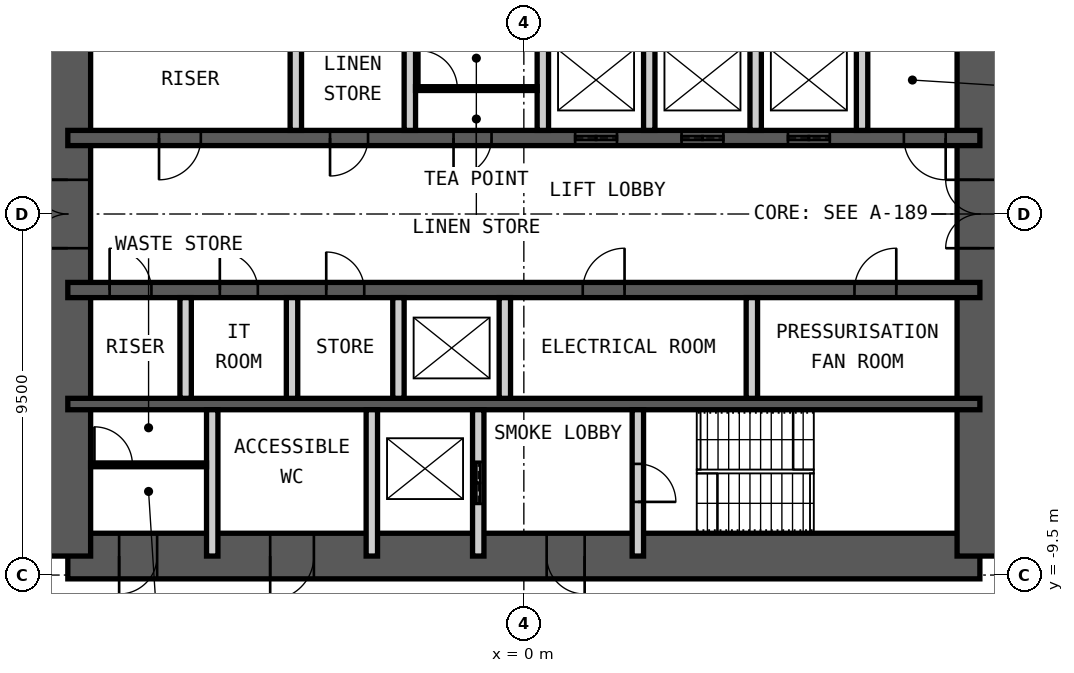
"""IFC4 building model, lengths in metres.
Left out: names, types, materials, properties, quantities, classifications, styles, units other than length and angle.
Written with IfcOpenShell. Run it as: python <this file> out.ifc"""

import sys

from ifc_helpers import new_model, si_unit, direction, frame, frame_2d, origin, place, context, subcontext, project, spatial, rectangle, extrude, element, fill, save


model = new_model("IFC4")
c1 = context("Model", 3, precision=1e-05, world=origin(), true_north=direction((0.0, 1.0)))
c2 = subcontext(c1, "Body", "Model", "MODEL_VIEW")
j1 = project(units=[si_unit("LENGTHUNIT", "METRE"), si_unit("PLANEANGLEUNIT", "RADIAN")], contexts=[c1])
p1 = place(None, origin())
s1 = spatial("IfcSite", under=j1, at=p1, CompositionType="ELEMENT")
p2 = place(p1, origin())
s2 = spatial("IfcBuilding", under=s1, at=p2, CompositionType="ELEMENT")
p3 = place(p2, frame((0.0, 0.0, 251.8)))
s3 = spatial("IfcBuildingStorey", under=s2, at=p3, CompositionType="ELEMENT", Elevation=251.8)
p4 = place(p3, frame((-12.0, -9.0, 0.0), z_axis=(0.0, 0.0, 1.0), x_axis=(1.0, 0.0, 0.0)))
e1 = element("IfcWall", 1, at=p4, inside=s3, PredefinedType="SHEAR", context=c2, shape_type="SweptSolid", body=[
    extrude(rectangle(XDim=24.0, YDim=1.2, at=frame_2d((12.0, 0.0))), origin(), (0.0, 0.0, 1.0), 4.2),
])
p5 = place(p4, frame((1.35, 0.0, 0.0)))
e2 = element("IfcOpeningElement", 2, at=p5, cuts=e1, PredefinedType="OPENING", context=c2, shape_type="SweptSolid", body=[
    extrude(rectangle(XDim=1.0, YDim=2.1, at=frame_2d((0.5, 1.05))), frame((0.0, 0.61, 0.0), z_axis=(0.0, -1.0, 0.0), x_axis=(1.0, 0.0, 0.0)), (0.0, 0.0, 1.0), 1.22),
])
p6 = place(p4, frame((5.325, 0.0, 0.0)))
e3 = element("IfcOpeningElement", 3, at=p6, cuts=e1, PredefinedType="OPENING", context=c2, shape_type="SweptSolid", body=[
    extrude(rectangle(XDim=1.15, YDim=2.1, at=frame_2d((0.575, 1.05))), frame((0.0, 0.61, 0.0), z_axis=(0.0, -1.0, 0.0), x_axis=(1.0, 0.0, 0.0)), (0.0, 0.0, 1.0), 1.22),
])
p7 = place(p4, frame((12.6, 0.0, 0.0)))
e4 = element("IfcOpeningElement", 4, at=p7, cuts=e1, PredefinedType="OPENING", context=c2, shape_type="SweptSolid", body=[
    extrude(rectangle(XDim=1.0, YDim=2.1, at=frame_2d((0.5, 1.05))), frame((0.0, 0.61, 0.0), z_axis=(0.0, -1.0, 0.0), x_axis=(1.0, 0.0, 0.0)), (0.0, 0.0, 1.0), 1.22),
])
p8 = place(p3, frame((12.0, -9.0, 0.0), z_axis=(0.0, 0.0, 1.0), x_axis=(0.0, 1.0, 0.0)))
e5 = element("IfcWall", 5, at=p8, inside=s3, PredefinedType="SHEAR", context=c2, shape_type="SweptSolid", body=[
    extrude(rectangle(XDim=18.0, YDim=1.2, at=frame_2d((9.0, 0.0))), origin(), (0.0, 0.0, 1.0), 4.2),
])
p9 = place(p8, frame((8.1, 0.0, 0.0)))
e6 = element("IfcOpeningElement", 6, at=p9, cuts=e5, PredefinedType="OPENING", context=c2, shape_type="SweptSolid", body=[
    extrude(rectangle(XDim=1.8, YDim=2.1, at=frame_2d((0.9, 1.05))), frame((0.0, 0.61, 0.0), z_axis=(0.0, -1.0, 0.0), x_axis=(1.0, 0.0, 0.0)), (0.0, 0.0, 1.0), 1.22),
])
p10 = place(p3, frame((-12.0, -9.0, 0.0), z_axis=(0.0, 0.0, 1.0), x_axis=(0.0, 1.0, 0.0)))
e7 = element("IfcWall", 7, at=p10, inside=s3, PredefinedType="SHEAR", context=c2, shape_type="SweptSolid", body=[
    extrude(rectangle(XDim=18.0, YDim=1.2, at=frame_2d((9.0, 0.0))), origin(), (0.0, 0.0, 1.0), 4.2),
])
p11 = place(p10, frame((8.1, 0.0, 0.0)))
e8 = element("IfcOpeningElement", 8, at=p11, cuts=e7, PredefinedType="OPENING", context=c2, shape_type="SweptSolid", body=[
    extrude(rectangle(XDim=1.8, YDim=2.1, at=frame_2d((0.9, 1.05))), frame((0.0, 0.61, 0.0), z_axis=(0.0, -1.0, 0.0), x_axis=(1.0, 0.0, 0.0)), (0.0, 0.0, 1.0), 1.22),
])
p12 = place(p3, frame((-12.0, 2.0, 0.0), z_axis=(0.0, 0.0, 1.0), x_axis=(1.0, 0.0, 0.0)))
e9 = element("IfcWall", 9, at=p12, inside=s3, PredefinedType="SHEAR", context=c2, shape_type="SweptSolid", body=[
    extrude(rectangle(XDim=24.0, YDim=0.4, at=frame_2d((12.0, 0.0))), origin(), (0.0, 0.0, 1.0), 4.2),
])
p13 = place(p12, frame((2.4, 0.0, 0.0)))
e10 = element("IfcOpeningElement", 10, at=p13, cuts=e9, PredefinedType="OPENING", context=c2, shape_type="SweptSolid", body=[
    extrude(rectangle(XDim=1.1, YDim=2.1, at=frame_2d((0.55, 1.05))), frame((0.0, 0.21, 0.0), z_axis=(0.0, -1.0, 0.0), x_axis=(1.0, 0.0, 0.0)), (0.0, 0.0, 1.0), 0.42),
])
p14 = place(p12, frame((22.0, 0.0, 0.0)))
e11 = element("IfcOpeningElement", 11, at=p14, cuts=e9, PredefinedType="OPENING", context=c2, shape_type="SweptSolid", body=[
    extrude(rectangle(XDim=1.1, YDim=2.1, at=frame_2d((0.55, 1.05))), frame((0.0, 0.21, 0.0), z_axis=(0.0, -1.0, 0.0), x_axis=(1.0, 0.0, 0.0)), (0.0, 0.0, 1.0), 0.42),
])
p15 = place(p12, frame((10.15, 0.0, 0.0)))
e12 = element("IfcOpeningElement", 12, at=p15, cuts=e9, PredefinedType="OPENING", context=c2, shape_type="SweptSolid", body=[
    extrude(rectangle(XDim=1.0, YDim=2.1, at=frame_2d((0.5, 1.05))), frame((0.0, 0.21, 0.0), z_axis=(0.0, -1.0, 0.0), x_axis=(1.0, 0.0, 0.0)), (0.0, 0.0, 1.0), 0.42),
])
p16 = place(p12, frame((6.9, 0.0, 0.0)))
e13 = element("IfcOpeningElement", 13, at=p16, cuts=e9, PredefinedType="OPENING", context=c2, shape_type="SweptSolid", body=[
    extrude(rectangle(XDim=1.0, YDim=2.1, at=frame_2d((0.5, 1.05))), frame((0.0, 0.21, 0.0), z_axis=(0.0, -1.0, 0.0), x_axis=(1.0, 0.0, 0.0)), (0.0, 0.0, 1.0), 0.42),
])
p17 = place(p12, frame((13.35, 0.0, 0.0)))
e14 = element("IfcOpeningElement", 14, at=p17, cuts=e9, PredefinedType="OPENING", context=c2, shape_type="SweptSolid", body=[
    extrude(rectangle(XDim=1.1, YDim=2.4, at=frame_2d((0.55, 1.2))), frame((0.0, 0.21, 0.0), z_axis=(0.0, -1.0, 0.0), x_axis=(1.0, 0.0, 0.0)), (0.0, 0.0, 1.0), 0.42),
])
p18 = place(p12, frame((16.15, 0.0, 0.0)))
e15 = element("IfcOpeningElement", 15, at=p18, cuts=e9, PredefinedType="OPENING", context=c2, shape_type="SweptSolid", body=[
    extrude(rectangle(XDim=1.1, YDim=2.4, at=frame_2d((0.55, 1.2))), frame((0.0, 0.21, 0.0), z_axis=(0.0, -1.0, 0.0), x_axis=(1.0, 0.0, 0.0)), (0.0, 0.0, 1.0), 0.42),
])
p19 = place(p12, frame((18.95, 0.0, 0.0)))
e16 = element("IfcOpeningElement", 16, at=p19, cuts=e9, PredefinedType="OPENING", context=c2, shape_type="SweptSolid", body=[
    extrude(rectangle(XDim=1.1, YDim=2.4, at=frame_2d((0.55, 1.2))), frame((0.0, 0.21, 0.0), z_axis=(0.0, -1.0, 0.0), x_axis=(1.0, 0.0, 0.0)), (0.0, 0.0, 1.0), 0.42),
])
p20 = place(p3, frame((-12.0, -2.0, 0.0), z_axis=(0.0, 0.0, 1.0), x_axis=(1.0, 0.0, 0.0)))
e17 = element("IfcWall", 17, at=p20, inside=s3, PredefinedType="SHEAR", context=c2, shape_type="SweptSolid", body=[
    extrude(rectangle(XDim=24.0, YDim=0.4, at=frame_2d((12.0, 0.0))), origin(), (0.0, 0.0, 1.0), 4.2),
])
p21 = place(p20, frame((1.1, 0.0, 0.0)))
e18 = element("IfcOpeningElement", 18, at=p21, cuts=e17, PredefinedType="OPENING", context=c2, shape_type="SweptSolid", body=[
    extrude(rectangle(XDim=1.1, YDim=2.1, at=frame_2d((0.55, 1.05))), frame((0.0, 0.21, 0.0), z_axis=(0.0, -1.0, 0.0), x_axis=(1.0, 0.0, 0.0)), (0.0, 0.0, 1.0), 0.42),
])
p22 = place(p20, frame((13.55, 0.0, 0.0)))
e19 = element("IfcOpeningElement", 19, at=p22, cuts=e17, PredefinedType="OPENING", context=c2, shape_type="SweptSolid", body=[
    extrude(rectangle(XDim=1.1, YDim=2.1, at=frame_2d((0.55, 1.05))), frame((0.0, 0.21, 0.0), z_axis=(0.0, -1.0, 0.0), x_axis=(1.0, 0.0, 0.0)), (0.0, 0.0, 1.0), 0.42),
])
p23 = place(p20, frame((20.7, 0.0, 0.0)))
e20 = element("IfcOpeningElement", 20, at=p23, cuts=e17, PredefinedType="OPENING", context=c2, shape_type="SweptSolid", body=[
    extrude(rectangle(XDim=1.1, YDim=2.1, at=frame_2d((0.55, 1.05))), frame((0.0, 0.21, 0.0), z_axis=(0.0, -1.0, 0.0), x_axis=(1.0, 0.0, 0.0)), (0.0, 0.0, 1.0), 0.42),
])
p24 = place(p20, frame((4.0, 0.0, 0.0)))
e21 = element("IfcOpeningElement", 21, at=p24, cuts=e17, PredefinedType="OPENING", context=c2, shape_type="SweptSolid", body=[
    extrude(rectangle(XDim=1.0, YDim=2.1, at=frame_2d((0.5, 1.05))), frame((0.0, 0.21, 0.0), z_axis=(0.0, -1.0, 0.0), x_axis=(1.0, 0.0, 0.0)), (0.0, 0.0, 1.0), 0.42),
])
p25 = place(p20, frame((6.8, 0.0, 0.0)))
e22 = element("IfcOpeningElement", 22, at=p25, cuts=e17, PredefinedType="OPENING", context=c2, shape_type="SweptSolid", body=[
    extrude(rectangle(XDim=1.0, YDim=2.1, at=frame_2d((0.5, 1.05))), frame((0.0, 0.21, 0.0), z_axis=(0.0, -1.0, 0.0), x_axis=(1.0, 0.0, 0.0)), (0.0, 0.0, 1.0), 0.42),
])
p26 = place(p3, frame((-12.0, -5.0, 0.0), z_axis=(0.0, 0.0, 1.0), x_axis=(1.0, 0.0, 0.0)))
e23 = element("IfcWall", 23, at=p26, inside=s3, PredefinedType="SHEAR", context=c2, shape_type="SweptSolid", body=[
    extrude(rectangle(XDim=24.0, YDim=0.3, at=frame_2d((12.0, 0.0))), origin(), (0.0, 0.0, 1.0), 4.2),
])
for number, where, z_axis, x_axis in (
    (24, (-6.0, 2.2, 0.0), (0.0, 0.0, 1.0), (0.0, 1.0, 0.0)),
    (25, (-3.0, 2.2, 0.0), (0.0, 0.0, 1.0), (0.0, 1.0, 0.0)),
    (26, (0.5, 2.2, 0.0), (0.0, 0.0, 1.0), (0.0, 1.0, 0.0)),
    (27, (3.3, 2.2, 0.0), (0.0, 0.0, 1.0), (0.0, 1.0, 0.0)),
    (28, (6.1, 2.2, 0.0), (0.0, 0.0, 1.0), (0.0, 1.0, 0.0)),
    (29, (8.9, 2.2, 0.0), (0.0, 0.0, 1.0), (0.0, 1.0, 0.0)),
    (30, (-8.9, -4.85, 0.0), (0.0, 0.0, 1.0), (0.0, 1.0, 0.0)),
    (31, (-6.1, -4.85, 0.0), (0.0, 0.0, 1.0), (0.0, 1.0, 0.0)),
    (32, (-3.3, -4.85, 0.0), (0.0, 0.0, 1.0), (0.0, 1.0, 0.0)),
    (33, (-0.5, -4.85, 0.0), (0.0, 0.0, 1.0), (0.0, 1.0, 0.0)),
    (34, (6.0, -4.85, 0.0), (0.0, 0.0, 1.0), (0.0, 1.0, 0.0)),
):
    element("IfcWall", number, at=place(p3, frame(where, z_axis=z_axis, x_axis=x_axis)), inside=s3, PredefinedType="PARTITIONING", context=c2, shape_type="SweptSolid", body=[
        extrude(rectangle(XDim=2.65, YDim=0.3, at=frame_2d((1.325, 0.0))), origin(), (0.0, 0.0, 1.0), 3.98),
    ])
for number, where, z_axis, x_axis in (
    (35, (-8.2, -9.0, 0.0), (0.0, 0.0, 1.0), (0.0, 1.0, 0.0)),
    (36, (-4.0, -9.0, 0.0), (0.0, 0.0, 1.0), (0.0, 1.0, 0.0)),
):
    element("IfcWall", number, at=place(p3, frame(where, z_axis=z_axis, x_axis=x_axis)), inside=s3, PredefinedType="PARTITIONING", context=c2, shape_type="SweptSolid", body=[
        extrude(rectangle(XDim=3.85, YDim=0.3, at=frame_2d((1.925, 0.0))), origin(), (0.0, 0.0, 1.0), 3.98),
    ])
p27 = place(p3, frame((-1.2, -9.0, 0.0), z_axis=(0.0, 0.0, 1.0), x_axis=(0.0, 1.0, 0.0)))
e37 = element("IfcWall", 37, at=p27, inside=s3, PredefinedType="PARTITIONING", context=c2, shape_type="SweptSolid", body=[
    extrude(rectangle(XDim=3.85, YDim=0.3, at=frame_2d((1.925, 0.0))), origin(), (0.0, 0.0, 1.0), 3.98),
])
p28 = place(p27, frame((1.375, 0.0, 0.0)))
e38 = element("IfcOpeningElement", 38, at=p28, cuts=e37, PredefinedType="OPENING", context=c2, shape_type="SweptSolid", body=[
    extrude(rectangle(XDim=1.1, YDim=2.4, at=frame_2d((0.55, 1.2))), frame((0.0, 0.16, 0.0), z_axis=(0.0, -1.0, 0.0), x_axis=(1.0, 0.0, 0.0)), (0.0, 0.0, 1.0), 0.32),
])
p29 = place(p3, frame((3.0, -9.0, 0.0), z_axis=(0.0, 0.0, 1.0), x_axis=(0.0, 1.0, 0.0)))
e39 = element("IfcWall", 39, at=p29, inside=s3, PredefinedType="PARTITIONING", context=c2, shape_type="SweptSolid", body=[
    extrude(rectangle(XDim=3.85, YDim=0.3, at=frame_2d((1.925, 0.0))), origin(), (0.0, 0.0, 1.0), 3.98),
])
p30 = place(p29, frame((1.425, 0.0, 0.0)))
e40 = element("IfcOpeningElement", 40, at=p30, cuts=e39, PredefinedType="OPENING", context=c2, shape_type="SweptSolid", body=[
    extrude(rectangle(XDim=1.0, YDim=2.1, at=frame_2d((0.5, 1.05))), frame((0.0, 0.16, 0.0), z_axis=(0.0, -1.0, 0.0), x_axis=(1.0, 0.0, 0.0)), (0.0, 0.0, 1.0), 0.32),
])
p31 = place(p3, frame((-2.85, 3.3, 0.0), z_axis=(0.0, 0.0, 1.0), x_axis=(1.0, 0.0, 0.0)))
e41 = element("IfcWall", 41, at=p31, inside=s3, PredefinedType="PARTITIONING", context=c2, shape_type="SweptSolid", body=[
    extrude(rectangle(XDim=3.2, YDim=0.1, at=frame_2d((1.6, 0.0))), origin(), (0.0, 0.0, 1.0), 3.98),
])
p32 = place(p31, frame((0.1, 0.0, 0.0)))
e42 = element("IfcOpeningElement", 42, at=p32, cuts=e41, PredefinedType="OPENING", context=c2, shape_type="SweptSolid", body=[
    extrude(rectangle(XDim=1.0, YDim=2.4, at=frame_2d((0.5, 1.2))), frame((0.0, 0.06, 0.0), z_axis=(0.0, -1.0, 0.0), x_axis=(1.0, 0.0, 0.0)), (0.0, 0.0, 1.0), 0.12),
])
p33 = place(p3, frame((-11.4, -6.6, 0.0), z_axis=(0.0, 0.0, 1.0), x_axis=(1.0, 0.0, 0.0)))
e43 = element("IfcWall", 43, at=p33, inside=s3, PredefinedType="PARTITIONING", context=c2, shape_type="SweptSolid", body=[
    extrude(rectangle(XDim=3.05, YDim=0.1, at=frame_2d((1.525, 0.0))), origin(), (0.0, 0.0, 1.0), 3.98),
])
p34 = place(p33, frame((0.1, 0.0, 0.0)))
e44 = element("IfcOpeningElement", 44, at=p34, cuts=e43, PredefinedType="OPENING", context=c2, shape_type="SweptSolid", body=[
    extrude(rectangle(XDim=1.0, YDim=2.4, at=frame_2d((0.5, 1.2))), frame((0.0, 0.06, 0.0), z_axis=(0.0, -1.0, 0.0), x_axis=(1.0, 0.0, 0.0)), (0.0, 0.0, 1.0), 0.12),
])
p35 = place(p5, origin())
e45 = element("IfcDoor", 45, at=p35, inside=s3, OperationType="SINGLE_SWING_LEFT", PredefinedType="DOOR", context=c2, shape_type="SweptSolid", body=[
    extrude(rectangle(XDim=1.0, YDim=2.1, at=frame_2d((0.5, 1.05))), frame((0.0, 0.025, 0.0), z_axis=(0.0, -1.0, 0.0), x_axis=(1.0, 0.0, 0.0)), (0.0, 0.0, 1.0), 0.05),
])
fill(e2, e45)
p36 = place(p6, origin())
e46 = element("IfcDoor", 46, at=p36, inside=s3, OperationType="SINGLE_SWING_LEFT", PredefinedType="DOOR", context=c2, shape_type="SweptSolid", body=[
    extrude(rectangle(XDim=1.15, YDim=2.1, at=frame_2d((0.575, 1.05))), frame((0.0, 0.025, 0.0), z_axis=(0.0, -1.0, 0.0), x_axis=(1.0, 0.0, 0.0)), (0.0, 0.0, 1.0), 0.05),
])
fill(e3, e46)
p37 = place(p7, origin())
e47 = element("IfcDoor", 47, at=p37, inside=s3, OperationType="SINGLE_SWING_RIGHT", PredefinedType="DOOR", context=c2, shape_type="SweptSolid", body=[
    extrude(rectangle(XDim=1.0, YDim=2.1, at=frame_2d((0.5, 1.05))), frame((0.0, 0.025, 0.0), z_axis=(0.0, -1.0, 0.0), x_axis=(1.0, 0.0, 0.0)), (0.0, 0.0, 1.0), 0.05),
])
fill(e4, e47)
p38 = place(p30, origin())
e48 = element("IfcDoor", 48, at=p38, inside=s3, OperationType="SINGLE_SWING_LEFT", PredefinedType="DOOR", context=c2, shape_type="SweptSolid", body=[
    extrude(rectangle(XDim=1.0, YDim=2.1, at=frame_2d((0.5, 1.05))), frame((0.0, 0.025, 0.0), z_axis=(0.0, -1.0, 0.0), x_axis=(1.0, 0.0, 0.0)), (0.0, 0.0, 1.0), 0.05),
])
fill(e40, e48)
p39 = place(p13, origin())
e49 = element("IfcDoor", 49, at=p39, inside=s3, OperationType="SINGLE_SWING_LEFT", PredefinedType="DOOR", context=c2, shape_type="SweptSolid", body=[
    extrude(rectangle(XDim=1.1, YDim=2.1, at=frame_2d((0.55, 1.05))), frame((0.0, 0.025, 0.0), z_axis=(0.0, -1.0, 0.0), x_axis=(1.0, 0.0, 0.0)), (0.0, 0.0, 1.0), 0.05),
])
fill(e10, e49)
p40 = place(p21, origin())
e50 = element("IfcDoor", 50, at=p40, inside=s3, OperationType="SINGLE_SWING_RIGHT", PredefinedType="DOOR", context=c2, shape_type="SweptSolid", body=[
    extrude(rectangle(XDim=1.1, YDim=2.1, at=frame_2d((0.55, 1.05))), frame((0.0, 0.025, 0.0), z_axis=(0.0, -1.0, 0.0), x_axis=(1.0, 0.0, 0.0)), (0.0, 0.0, 1.0), 0.05),
])
fill(e18, e50)
p41 = place(p14, origin())
e51 = element("IfcDoor", 51, at=p41, inside=s3, OperationType="SINGLE_SWING_RIGHT", PredefinedType="DOOR", context=c2, shape_type="SweptSolid", body=[
    extrude(rectangle(XDim=1.1, YDim=2.1, at=frame_2d((0.55, 1.05))), frame((0.0, 0.025, 0.0), z_axis=(0.0, -1.0, 0.0), x_axis=(1.0, 0.0, 0.0)), (0.0, 0.0, 1.0), 0.05),
])
fill(e11, e51)
p42 = place(p15, origin())
e52 = element("IfcDoor", 52, at=p42, inside=s3, OperationType="SINGLE_SWING_LEFT", PredefinedType="DOOR", context=c2, shape_type="SweptSolid", body=[
    extrude(rectangle(XDim=1.0, YDim=2.1, at=frame_2d((0.5, 1.05))), frame((0.0, 0.025, 0.0), z_axis=(0.0, -1.0, 0.0), x_axis=(1.0, 0.0, 0.0)), (0.0, 0.0, 1.0), 0.05),
])
fill(e12, e52)
p43 = place(p22, origin())
e53 = element("IfcDoor", 53, at=p43, inside=s3, OperationType="SINGLE_SWING_LEFT", PredefinedType="DOOR", context=c2, shape_type="SweptSolid", body=[
    extrude(rectangle(XDim=1.1, YDim=2.1, at=frame_2d((0.55, 1.05))), frame((0.0, 0.025, 0.0), z_axis=(0.0, -1.0, 0.0), x_axis=(1.0, 0.0, 0.0)), (0.0, 0.0, 1.0), 0.05),
])
fill(e19, e53)
p44 = place(p23, origin())
e54 = element("IfcDoor", 54, at=p44, inside=s3, OperationType="SINGLE_SWING_LEFT", PredefinedType="DOOR", context=c2, shape_type="SweptSolid", body=[
    extrude(rectangle(XDim=1.1, YDim=2.1, at=frame_2d((0.55, 1.05))), frame((0.0, 0.025, 0.0), z_axis=(0.0, -1.0, 0.0), x_axis=(1.0, 0.0, 0.0)), (0.0, 0.0, 1.0), 0.05),
])
fill(e20, e54)
p45 = place(p9, origin())
e55 = element("IfcDoor", 55, at=p45, inside=s3, OperationType="DOUBLE_DOOR_DOUBLE_SWING", PredefinedType="DOOR", context=c2, shape_type="SweptSolid", body=[
    extrude(rectangle(XDim=1.8, YDim=2.1, at=frame_2d((0.9, 1.05))), frame((0.0, 0.025, 0.0), z_axis=(0.0, -1.0, 0.0), x_axis=(1.0, 0.0, 0.0)), (0.0, 0.0, 1.0), 0.05),
])
fill(e6, e55)
p46 = place(p11, origin())
e56 = element("IfcDoor", 56, at=p46, inside=s3, OperationType="DOUBLE_DOOR_DOUBLE_SWING", PredefinedType="DOOR", context=c2, shape_type="SweptSolid", body=[
    extrude(rectangle(XDim=1.8, YDim=2.1, at=frame_2d((0.9, 1.05))), frame((0.0, 0.025, 0.0), z_axis=(0.0, -1.0, 0.0), x_axis=(1.0, 0.0, 0.0)), (0.0, 0.0, 1.0), 0.05),
])
fill(e8, e56)
p47 = place(p28, origin())
e57 = element("IfcDoor", 57, at=p47, inside=s3, OperationType="DOUBLE_DOOR_SLIDING", PredefinedType="DOOR", context=c2, shape_type="SweptSolid", body=[
    extrude(rectangle(XDim=1.1, YDim=2.4, at=frame_2d((0.55, 1.2))), frame((0.0, 0.025, 0.0), z_axis=(0.0, -1.0, 0.0), x_axis=(1.0, 0.0, 0.0)), (0.0, 0.0, 1.0), 0.05),
])
fill(e38, e57)
p48 = place(p16, origin())
e58 = element("IfcDoor", 58, at=p48, inside=s3, OperationType="SINGLE_SWING_LEFT", PredefinedType="DOOR", context=c2, shape_type="SweptSolid", body=[
    extrude(rectangle(XDim=1.0, YDim=2.1, at=frame_2d((0.5, 1.05))), frame((0.0, 0.025, 0.0), z_axis=(0.0, -1.0, 0.0), x_axis=(1.0, 0.0, 0.0)), (0.0, 0.0, 1.0), 0.05),
])
fill(e13, e58)
p49 = place(p17, origin())
e59 = element("IfcDoor", 59, at=p49, inside=s3, OperationType="DOUBLE_DOOR_SLIDING", PredefinedType="DOOR", context=c2, shape_type="SweptSolid", body=[
    extrude(rectangle(XDim=1.1, YDim=2.4, at=frame_2d((0.55, 1.2))), frame((0.0, 0.025, 0.0), z_axis=(0.0, -1.0, 0.0), x_axis=(1.0, 0.0, 0.0)), (0.0, 0.0, 1.0), 0.05),
])
fill(e14, e59)
p50 = place(p18, origin())
e60 = element("IfcDoor", 60, at=p50, inside=s3, OperationType="DOUBLE_DOOR_SLIDING", PredefinedType="DOOR", context=c2, shape_type="SweptSolid", body=[
    extrude(rectangle(XDim=1.1, YDim=2.4, at=frame_2d((0.55, 1.2))), frame((0.0, 0.025, 0.0), z_axis=(0.0, -1.0, 0.0), x_axis=(1.0, 0.0, 0.0)), (0.0, 0.0, 1.0), 0.05),
])
fill(e15, e60)
p51 = place(p19, origin())
e61 = element("IfcDoor", 61, at=p51, inside=s3, OperationType="DOUBLE_DOOR_SLIDING", PredefinedType="DOOR", context=c2, shape_type="SweptSolid", body=[
    extrude(rectangle(XDim=1.1, YDim=2.4, at=frame_2d((0.55, 1.2))), frame((0.0, 0.025, 0.0), z_axis=(0.0, -1.0, 0.0), x_axis=(1.0, 0.0, 0.0)), (0.0, 0.0, 1.0), 0.05),
])
fill(e16, e61)
p52 = place(p24, origin())
e62 = element("IfcDoor", 62, at=p52, inside=s3, OperationType="SINGLE_SWING_RIGHT", PredefinedType="DOOR", context=c2, shape_type="SweptSolid", body=[
    extrude(rectangle(XDim=1.0, YDim=2.1, at=frame_2d((0.5, 1.05))), frame((0.0, 0.025, 0.0), z_axis=(0.0, -1.0, 0.0), x_axis=(1.0, 0.0, 0.0)), (0.0, 0.0, 1.0), 0.05),
])
fill(e21, e62)
p53 = place(p25, origin())
e63 = element("IfcDoor", 63, at=p53, inside=s3, OperationType="SINGLE_SWING_RIGHT", PredefinedType="DOOR", context=c2, shape_type="SweptSolid", body=[
    extrude(rectangle(XDim=1.0, YDim=2.1, at=frame_2d((0.5, 1.05))), frame((0.0, 0.025, 0.0), z_axis=(0.0, -1.0, 0.0), x_axis=(1.0, 0.0, 0.0)), (0.0, 0.0, 1.0), 0.05),
])
fill(e22, e63)
p54 = place(p32, origin())
e64 = element("IfcDoor", 64, at=p54, inside=s3, OperationType="SINGLE_SWING_RIGHT", PredefinedType="DOOR", context=c2, shape_type="SweptSolid", body=[
    extrude(rectangle(XDim=1.0, YDim=2.4, at=frame_2d((0.5, 1.2))), frame((0.0, 0.025, 0.0), z_axis=(0.0, -1.0, 0.0), x_axis=(1.0, 0.0, 0.0)), (0.0, 0.0, 1.0), 0.05),
])
fill(e42, e64)
p55 = place(p34, origin())
e65 = element("IfcDoor", 65, at=p55, inside=s3, OperationType="SINGLE_SWING_RIGHT", PredefinedType="DOOR", context=c2, shape_type="SweptSolid", body=[
    extrude(rectangle(XDim=1.0, YDim=2.4, at=frame_2d((0.5, 1.2))), frame((0.0, 0.025, 0.0), z_axis=(0.0, -1.0, 0.0), x_axis=(1.0, 0.0, 0.0)), (0.0, 0.0, 1.0), 0.05),
])
fill(e44, e65)
save(model, sys.argv[1])
